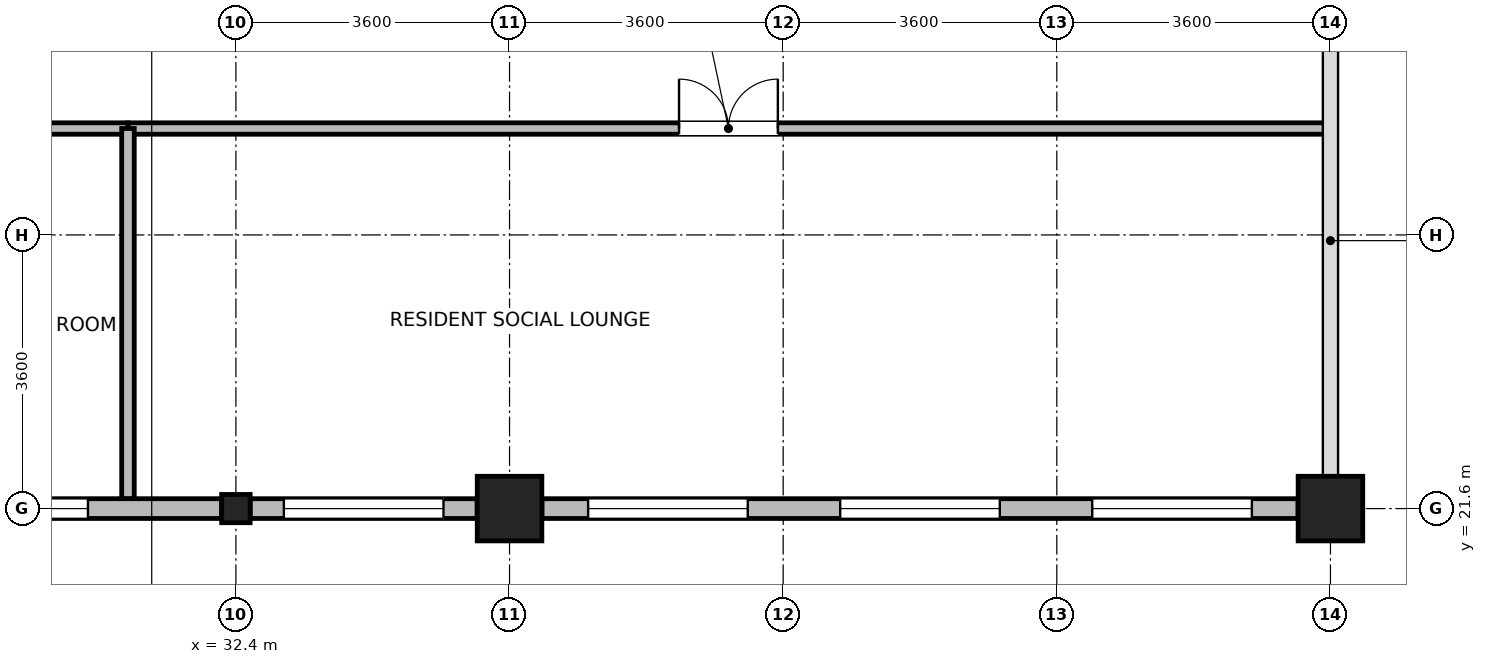
"""IFC4 building model, lengths in metres.
Left out: names, types, materials, properties, quantities, classifications, styles, units other than length and angle.
Written with IfcOpenShell. Run it as: python <this file> out.ifc"""

import sys

from ifc_helpers import new_model, si_unit, direction, frame, frame_2d, origin, origin_2d, place, context, subcontext, project, spatial, rectangle, i_section, extrude, source, transform, mapped, element, fill, save


model = new_model("IFC4")
c1 = context("Model", 3, precision=1e-05, world=origin(), true_north=direction((0.0, 1.0)))
c2 = subcontext(c1, "Body", "Model", "MODEL_VIEW")
j1 = project(units=[si_unit("LENGTHUNIT", "METRE"), si_unit("PLANEANGLEUNIT", "RADIAN")], contexts=[c1])
p1 = place(None, origin())
s1 = spatial("IfcSite", under=j1, at=p1, CompositionType="ELEMENT")
p2 = place(p1, origin())
s2 = spatial("IfcBuilding", under=s1, at=p2, CompositionType="ELEMENT")
p3 = place(p2, frame((0.0, 0.0, 253.6)))
s3 = spatial("IfcBuildingStorey", under=s2, at=p3, CompositionType="ELEMENT", Elevation=253.6)
m1 = source(origin(), c2, "Body", "SweptSolid", [
    extrude(rectangle(XDim=0.85, YDim=0.85, at=origin_2d()), origin(), (0.0, 0.0, 1.0), 3.7),
])
for number, where, z_axis, x_axis in (
    (1, (36.0, 21.6, 0.0), (0.0, 0.0, 1.0), (1.0, 0.0, 0.0)),
    (2, (46.8, 21.6, 0.0), (0.0, 0.0, 1.0), (1.0, 0.0, 0.0)),
):
    element("IfcColumn", number, at=place(p3, frame(where, z_axis=z_axis, x_axis=x_axis)), inside=s3, PredefinedType="COLUMN", context=c2, shape_type="MappedRepresentation", body=[
        mapped(m1, transform((0.0, 0.0, 0.0), x_axis=(1.0, 0.0, 0.0), y_axis=(0.0, 1.0, 0.0), z_axis=(0.0, 0.0, 1.0), scale=1.0)),
    ])
m2 = source(origin(), c2, "Body", "SweptSolid", [
    extrude(i_section(OverallWidth=0.374, OverallDepth=0.372, WebThickness=0.015, FlangeThickness=0.026, FilletRadius=0.015, at=origin_2d()), origin(), (0.0, 0.0, 1.0), 3.7),
])
p4 = place(p3, frame((32.4, 21.6, 0.0), z_axis=(0.0, 0.0, 1.0), x_axis=(1.0, 0.0, 0.0)))
e3 = element("IfcColumn", 3, at=p4, inside=s3, PredefinedType="COLUMN", context=c2, shape_type="MappedRepresentation", body=[
    mapped(m2, transform((0.0, 0.0, 0.0), x_axis=(1.0, 0.0, 0.0), y_axis=(0.0, 1.0, 0.0), z_axis=(0.0, 0.0, 1.0), scale=1.0)),
])
p5 = place(p3, frame((32.212, 21.6, 0.0), z_axis=(0.0, 0.0, 1.0), x_axis=(-1.0, 0.0, 0.0)))
e4 = element("IfcWall", 4, at=p5, inside=s3, PredefinedType="STANDARD", context=c2, shape_type="SweptSolid", body=[
    extrude(rectangle(XDim=2.986, YDim=0.26, at=frame_2d((1.493, 0.0))), origin(), (0.0, 0.0, 1.0), 3.055),
])
p6 = place(p5, frame((1.759, 0.0, 0.85)))
e5 = element("IfcOpeningElement", 5, at=p6, cuts=e4, PredefinedType="OPENING", context=c2, shape_type="SweptSolid", body=[
    extrude(rectangle(XDim=0.95, YDim=1.75, at=frame_2d((0.475, 0.875))), frame((0.0, 0.14, 0.0), z_axis=(0.0, -1.0, 0.0), x_axis=(1.0, 0.0, 0.0)), (0.0, 0.0, 1.0), 0.28),
])
p7 = place(p3, frame((35.574, 21.6, 0.0), z_axis=(0.0, 0.0, 1.0), x_axis=(-1.0, 0.0, 0.0)))
e6 = element("IfcWall", 6, at=p7, inside=s3, PredefinedType="STANDARD", context=c2, shape_type="SweptSolid", body=[
    extrude(rectangle(XDim=2.986, YDim=0.26, at=frame_2d((1.493, 0.0))), origin(), (0.0, 0.0, 1.0), 3.055),
])
p8 = place(p7, frame((0.443, 0.0, 0.85)))
e7 = element("IfcOpeningElement", 7, at=p8, cuts=e6, PredefinedType="OPENING", context=c2, shape_type="SweptSolid", body=[
    extrude(rectangle(XDim=2.1, YDim=1.95, at=frame_2d((1.05, 0.975))), frame((0.0, 0.14, 0.0), z_axis=(0.0, -1.0, 0.0), x_axis=(1.0, 0.0, 0.0)), (0.0, 0.0, 1.0), 0.28),
])
p9 = place(p3, frame((46.374, 21.6, 0.0), z_axis=(0.0, 0.0, 1.0), x_axis=(-1.0, 0.0, 0.0)))
e8 = element("IfcWall", 8, at=p9, inside=s3, PredefinedType="STANDARD", context=c2, shape_type="SweptSolid", body=[
    extrude(rectangle(XDim=9.948, YDim=0.26, at=frame_2d((4.974, 0.0))), origin(), (0.0, 0.0, 1.0), 3.055),
])
p10 = place(p9, frame((0.608, 0.0, 0.85)))
e9 = element("IfcOpeningElement", 9, at=p10, cuts=e8, PredefinedType="OPENING", context=c2, shape_type="SweptSolid", body=[
    extrude(rectangle(XDim=2.1, YDim=1.95, at=frame_2d((1.05, 0.975))), frame((0.0, 0.14, 0.0), z_axis=(0.0, -1.0, 0.0), x_axis=(1.0, 0.0, 0.0)), (0.0, 0.0, 1.0), 0.28),
])
p11 = place(p9, frame((3.924, 0.0, 0.85)))
e10 = element("IfcOpeningElement", 10, at=p11, cuts=e8, PredefinedType="OPENING", context=c2, shape_type="SweptSolid", body=[
    extrude(rectangle(XDim=2.1, YDim=1.95, at=frame_2d((1.05, 0.975))), frame((0.0, 0.14, 0.0), z_axis=(0.0, -1.0, 0.0), x_axis=(1.0, 0.0, 0.0)), (0.0, 0.0, 1.0), 0.28),
])
p12 = place(p9, frame((7.24, 0.0, 0.85)))
e11 = element("IfcOpeningElement", 11, at=p12, cuts=e8, PredefinedType="OPENING", context=c2, shape_type="SweptSolid", body=[
    extrude(rectangle(XDim=2.1, YDim=1.95, at=frame_2d((1.05, 0.975))), frame((0.0, 0.14, 0.0), z_axis=(0.0, -1.0, 0.0), x_axis=(1.0, 0.0, 0.0)), (0.0, 0.0, 1.0), 0.28),
])
p13 = place(p3, frame((30.98, 26.6, 0.0), z_axis=(0.0, 0.0, 1.0), x_axis=(1.0, 0.0, 0.0)))
e12 = element("IfcWall", 12, at=p13, inside=s3, PredefinedType="PARTITIONING", context=c2, shape_type="SweptSolid", body=[
    extrude(rectangle(XDim=15.8, YDim=0.15, at=frame_2d((7.9, 0.0))), origin(), (0.0, 0.0, 1.0), 3.455),
])
p14 = place(p13, frame((7.25, 0.0, 0.0)))
e13 = element("IfcOpeningElement", 13, at=p14, cuts=e12, PredefinedType="OPENING", context=c2, shape_type="SweptSolid", body=[
    extrude(rectangle(XDim=1.3, YDim=2.12, at=frame_2d((0.65, 1.06))), frame((0.0, 0.085, 0.0), z_axis=(0.0, -1.0, 0.0), x_axis=(1.0, 0.0, 0.0)), (0.0, 0.0, 1.0), 0.17),
])
p15 = place(p3, frame((22.66, 26.6, 0.0), z_axis=(0.0, 0.0, 1.0), x_axis=(1.0, 0.0, 0.0)))
e14 = element("IfcWall", 14, at=p15, inside=s3, PredefinedType="PARTITIONING", context=c2, shape_type="SweptSolid", body=[
    extrude(rectangle(XDim=8.32, YDim=0.15, at=frame_2d((4.16, 0.0))), origin(), (0.0, 0.0, 1.0), 3.455),
])
p16 = place(p15, frame((3.51, 0.0, 0.0)))
e15 = element("IfcOpeningElement", 15, at=p16, cuts=e14, PredefinedType="OPENING", context=c2, shape_type="SweptSolid", body=[
    extrude(rectangle(XDim=1.3, YDim=2.12, at=frame_2d((0.65, 1.06))), frame((0.0, 0.085, 0.0), z_axis=(0.0, -1.0, 0.0), x_axis=(1.0, 0.0, 0.0)), (0.0, 0.0, 1.0), 0.17),
])
p17 = place(p3, frame((30.98, 21.732, 0.0), z_axis=(0.0, 0.0, 1.0), x_axis=(0.0, 1.0, 0.0)))
e16 = element("IfcWall", 16, at=p17, inside=s3, PredefinedType="PARTITIONING", context=c2, shape_type="SweptSolid", body=[
    extrude(rectangle(XDim=4.868, YDim=0.165, at=frame_2d((2.434, 0.0))), origin(), (0.0, 0.0, 1.0), 3.455),
])
p18 = place(p6, origin())
e17 = element("IfcWindow", 17, at=p18, inside=s3, PartitioningType="SINGLE_PANEL", PredefinedType="WINDOW", context=c2, shape_type="SweptSolid", body=[
    extrude(rectangle(XDim=0.95, YDim=1.75, at=frame_2d((0.475, 0.875))), frame((0.0, 0.03, 0.0), z_axis=(0.0, -1.0, 0.0), x_axis=(1.0, 0.0, 0.0)), (0.0, 0.0, 1.0), 0.06),
])
fill(e5, e17)
p19 = place(p8, origin())
e18 = element("IfcWindow", 18, at=p19, inside=s3, PartitioningType="SINGLE_PANEL", PredefinedType="WINDOW", context=c2, shape_type="SweptSolid", body=[
    extrude(rectangle(XDim=2.1, YDim=1.95, at=frame_2d((1.05, 0.975))), frame((0.0, 0.03, 0.0), z_axis=(0.0, -1.0, 0.0), x_axis=(1.0, 0.0, 0.0)), (0.0, 0.0, 1.0), 0.06),
])
fill(e7, e18)
p20 = place(p10, origin())
e19 = element("IfcWindow", 19, at=p20, inside=s3, PartitioningType="SINGLE_PANEL", PredefinedType="WINDOW", context=c2, shape_type="SweptSolid", body=[
    extrude(rectangle(XDim=2.1, YDim=1.95, at=frame_2d((1.05, 0.975))), frame((0.0, 0.03, 0.0), z_axis=(0.0, -1.0, 0.0), x_axis=(1.0, 0.0, 0.0)), (0.0, 0.0, 1.0), 0.06),
])
fill(e9, e19)
p21 = place(p11, origin())
e20 = element("IfcWindow", 20, at=p21, inside=s3, PartitioningType="SINGLE_PANEL", PredefinedType="WINDOW", context=c2, shape_type="SweptSolid", body=[
    extrude(rectangle(XDim=2.1, YDim=1.95, at=frame_2d((1.05, 0.975))), frame((0.0, 0.03, 0.0), z_axis=(0.0, -1.0, 0.0), x_axis=(1.0, 0.0, 0.0)), (0.0, 0.0, 1.0), 0.06),
])
fill(e10, e20)
p22 = place(p12, origin())
e21 = element("IfcWindow", 21, at=p22, inside=s3, PartitioningType="SINGLE_PANEL", PredefinedType="WINDOW", context=c2, shape_type="SweptSolid", body=[
    extrude(rectangle(XDim=2.1, YDim=1.95, at=frame_2d((1.05, 0.975))), frame((0.0, 0.03, 0.0), z_axis=(0.0, -1.0, 0.0), x_axis=(1.0, 0.0, 0.0)), (0.0, 0.0, 1.0), 0.06),
])
fill(e11, e21)
p23 = place(p14, origin())
e22 = element("IfcDoor", 22, at=p23, inside=s3, OperationType="DOUBLE_DOOR_SINGLE_SWING", PredefinedType="DOOR", context=c2, shape_type="SweptSolid", body=[
    extrude(rectangle(XDim=1.3, YDim=2.12, at=frame_2d((0.65, 1.06))), frame((0.0, 0.025, 0.0), z_axis=(0.0, -1.0, 0.0), x_axis=(1.0, 0.0, 0.0)), (0.0, 0.0, 1.0), 0.05),
])
fill(e13, e22)
save(model, sys.argv[1])
